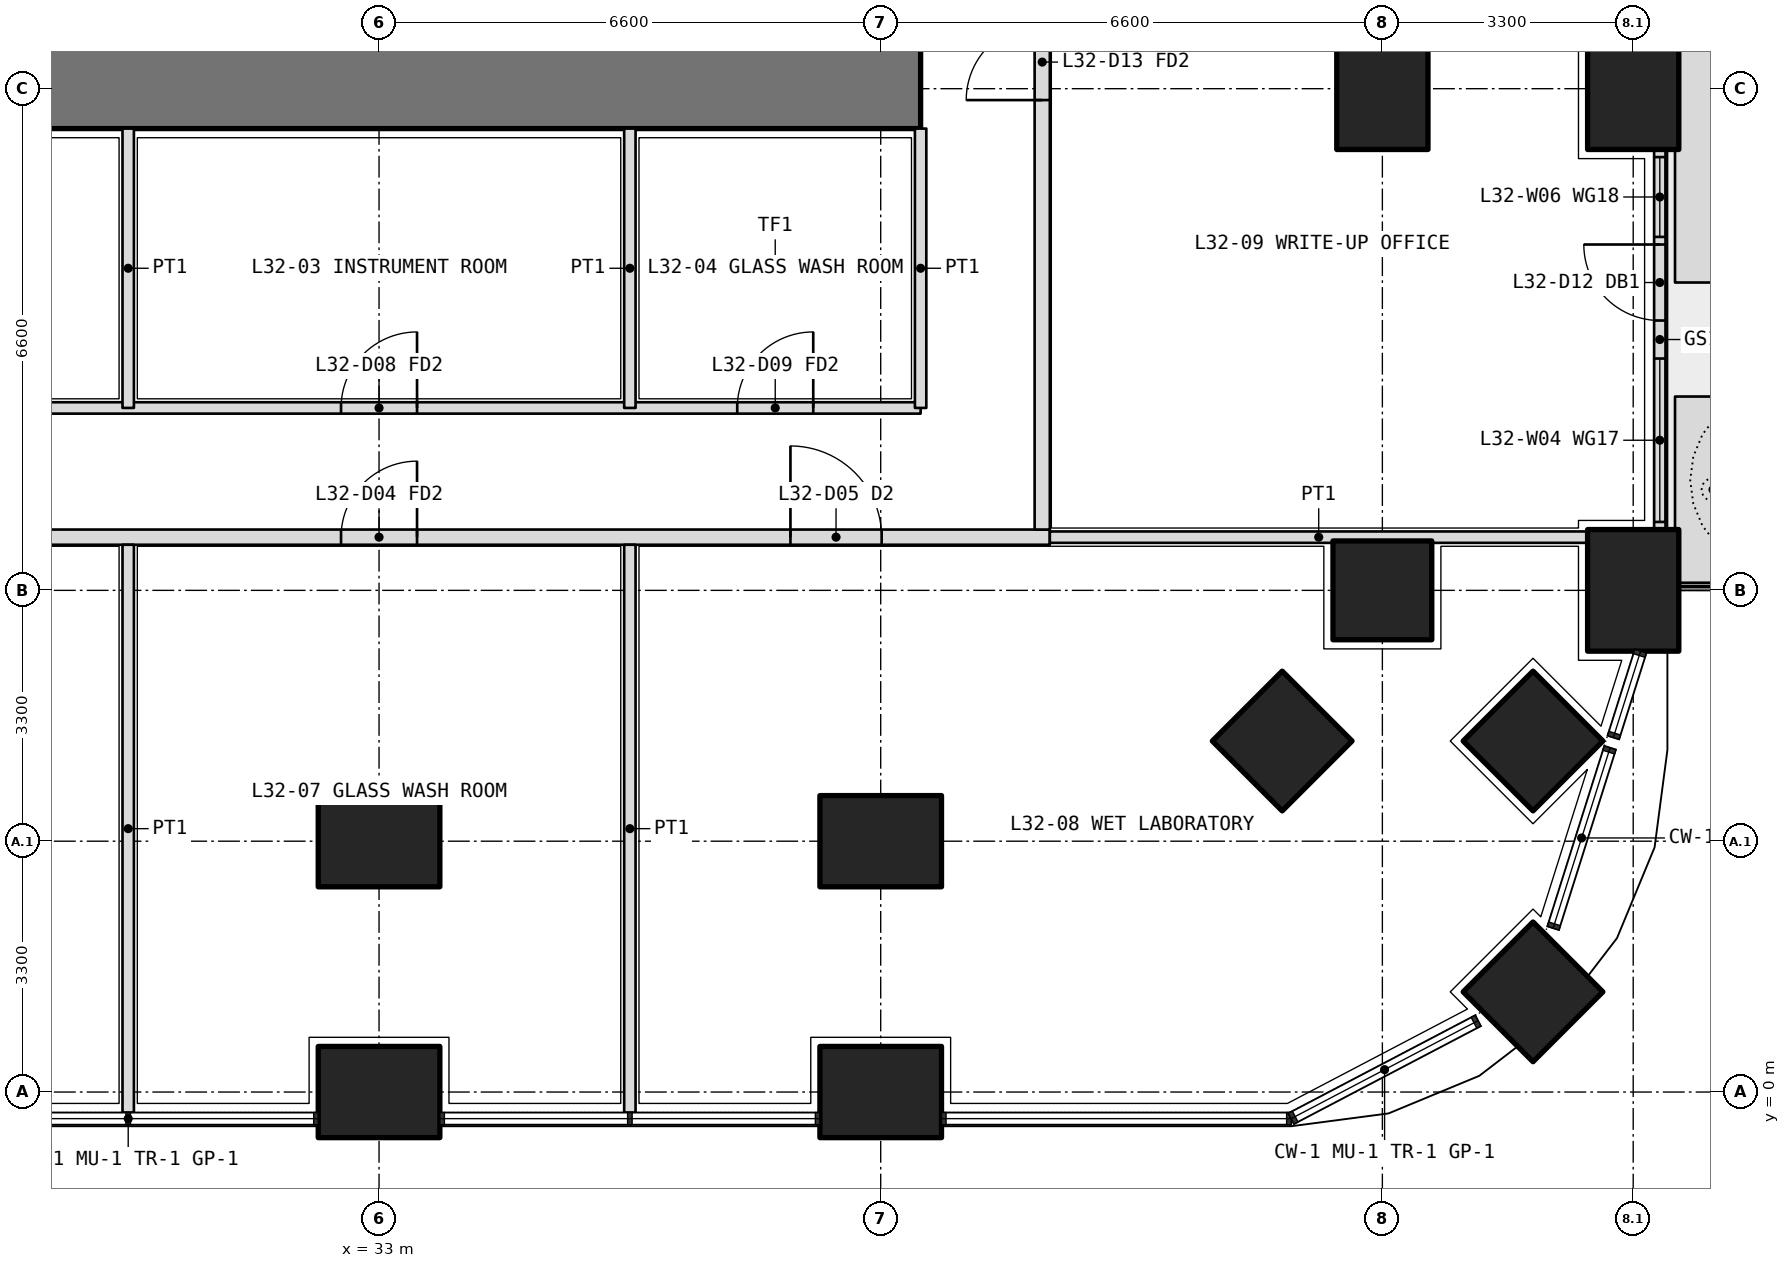
"""IFC4 building model, lengths in metres.
Left out: names, types, materials, properties, quantities, classifications, styles, units other than length and angle.
Written with IfcOpenShell. Run it as: python <this file> out.ifc"""

import sys

from ifc_helpers import new_model, si_unit, direction, frame, frame_2d, origin, origin_2d, place, context, subcontext, project, spatial, polyline, rectangle, outline, extrude, element, fill, save


model = new_model("IFC4")
c1 = context("Model", 3, precision=1e-05, world=origin(), true_north=direction((0.0, 1.0)))
c2 = subcontext(c1, "Body", "Model", "MODEL_VIEW")
j1 = project(units=[si_unit("LENGTHUNIT", "METRE"), si_unit("PLANEANGLEUNIT", "RADIAN")], contexts=[c1])
p1 = place(None, origin())
s1 = spatial("IfcSite", under=j1, at=p1, CompositionType="ELEMENT")
p2 = place(p1, origin())
s2 = spatial("IfcBuilding", under=s1, at=p2, CompositionType="ELEMENT")
p3 = place(p2, frame((0.0, 0.0, 141.0)))
s3 = spatial("IfcBuildingStorey", under=s2, at=p3, CompositionType="ELEMENT", Elevation=141.0)
p4 = place(p3, frame((48.182, 1.318, 0.0), z_axis=(0.0, 0.0, 1.0), x_axis=(0.707106781187, 0.707106781187, 0.0)))
e1 = element("IfcColumn", 1, at=p4, inside=s3, PredefinedType="COLUMN", context=c2, shape_type="SweptSolid", body=[
    extrude(rectangle(XDim=1.3, YDim=1.3, at=origin_2d()), origin(), (0.0, 0.0, 1.0), 4.2),
])
for number, where, z_axis, x_axis in (
    (2, (33.0, 0.0, 0.0), (0.0, 0.0, 1.0), (1.0, 0.0, 0.0)),
    (3, (39.6, 0.0, 0.0), (0.0, 0.0, 1.0), (1.0, 0.0, 0.0)),
    (4, (49.5, 6.6, 0.0), (0.0, 0.0, 1.0), (0.0, 1.0, 0.0)),
    (5, (49.5, 13.2, 0.0), (0.0, 0.0, 1.0), (0.0, 1.0, 0.0)),
):
    element("IfcColumn", number, at=place(p3, frame(where, z_axis=z_axis, x_axis=x_axis)), inside=s3, PredefinedType="COLUMN", context=c2, shape_type="SweptSolid", body=[
        extrude(rectangle(XDim=1.6, YDim=1.2, at=origin_2d()), origin(), (0.0, 0.0, 1.0), 4.2),
    ])
for number, where, z_axis, x_axis in (
    (6, (46.2, 6.6, 0.0), (0.0, 0.0, 1.0), (1.0, 0.0, 0.0)),
    (7, (48.182, 4.618, 0.0), (0.0, 0.0, 1.0), (0.707, 0.707, 0.0)),
):
    element("IfcColumn", number, at=place(p3, frame(where, z_axis=z_axis, x_axis=x_axis)), inside=s3, PredefinedType="COLUMN", context=c2, shape_type="SweptSolid", body=[
        extrude(rectangle(XDim=1.3, YDim=1.3, at=origin_2d()), origin(), (0.0, 0.0, 1.0), 4.2),
    ])
for number, where, z_axis, x_axis in (
    (8, (33.0, 3.3, 0.0), (0.0, 0.0, 1.0), (1.0, 0.0, 0.0)),
    (9, (39.6, 3.3, 0.0), (0.0, 0.0, 1.0), (1.0, 0.0, 0.0)),
):
    element("IfcColumn", number, at=place(p3, frame(where, z_axis=z_axis, x_axis=x_axis)), inside=s3, PredefinedType="COLUMN", context=c2, shape_type="SweptSolid", body=[
        extrude(rectangle(XDim=1.6, YDim=1.2, at=origin_2d()), origin(), (0.0, 0.0, 1.0), 4.2),
    ])
p5 = place(p3, frame((44.882, 4.618, 0.0), z_axis=(0.0, 0.0, 1.0), x_axis=(0.707106781187, 0.707106781187, 0.0)))
e10 = element("IfcColumn", 10, at=p5, inside=s3, PredefinedType="COLUMN", context=c2, shape_type="SweptSolid", body=[
    extrude(rectangle(XDim=1.3, YDim=1.3, at=origin_2d()), origin(), (0.0, 0.0, 1.0), 4.2),
])
p6 = place(p3, frame((46.2, 13.2, 0.0), z_axis=(0.0, 0.0, 1.0), x_axis=(0.0, 1.0, 0.0)))
e11 = element("IfcColumn", 11, at=p6, inside=s3, PredefinedType="COLUMN", context=c2, shape_type="SweptSolid", body=[
    extrude(rectangle(XDim=1.6, YDim=1.2, at=origin_2d()), origin(), (0.0, 0.0, 1.0), 4.2),
])
p7 = place(p3, origin())
e12 = element("IfcWall", 12, at=p7, inside=s3, PredefinedType="USERDEFINED", context=c2, shape_type="SweptSolid", body=[
    extrude(outline(polyline([(50.05, 6.7), (51.05, 6.7), (51.05, 9.15), (50.05, 9.15), (50.05, 6.7)]), holes=[polyline([(50.2, 6.85), (50.9, 6.85), (50.9, 9.0), (50.2, 9.0), (50.2, 6.85)])]), origin(), (0.0, 0.0, 1.0), 1.05),
])
p8 = place(p3, origin())
e13 = element("IfcWall", 13, at=p8, inside=s3, PredefinedType="USERDEFINED", context=c2, shape_type="SweptSolid", body=[
    extrude(outline(polyline([(50.05, 10.65), (51.05, 10.65), (51.05, 19.7), (50.05, 19.7), (50.05, 10.65)]), holes=[polyline([(50.2, 10.8), (50.9, 10.8), (50.9, 19.55), (50.2, 19.55), (50.2, 10.8)])]), origin(), (0.0, 0.0, 1.0), 1.05),
])
p9 = place(p3, frame((49.85, 7.4, 0.0), z_axis=(0.0, 0.0, 1.0), x_axis=(0.0, 1.0, 0.0)))
e14 = element("IfcWall", 14, at=p9, inside=s3, PredefinedType="SOLIDWALL", context=c2, shape_type="SweptSolid", body=[
    extrude(rectangle(XDim=5.0, YDim=0.15, at=frame_2d((2.5, 0.0))), origin(), (0.0, 0.0, 1.0), 2.6),
])
p10 = place(p9, frame((2.75, 0.0, 0.0)))
e15 = element("IfcOpeningElement", 15, at=p10, cuts=e14, PredefinedType="OPENING", context=c2, shape_type="SweptSolid", body=[
    extrude(rectangle(XDim=1.0, YDim=2.4, at=frame_2d((0.5, 1.2))), frame((0.0, 0.085, 0.0), z_axis=(0.0, -1.0, 0.0), x_axis=(1.0, 0.0, 0.0)), (0.0, 0.0, 1.0), 0.17),
])
p11 = place(p9, frame((0.1, 0.0, 0.1)))
e16 = element("IfcOpeningElement", 16, at=p11, cuts=e14, PredefinedType="OPENING", context=c2, shape_type="SweptSolid", body=[
    extrude(rectangle(XDim=2.15, YDim=2.2, at=frame_2d((1.075, 1.1))), frame((0.0, 0.085, 0.0), z_axis=(0.0, -1.0, 0.0), x_axis=(1.0, 0.0, 0.0)), (0.0, 0.0, 1.0), 0.17),
])
p12 = place(p9, frame((3.85, 0.0, 0.1)))
e17 = element("IfcOpeningElement", 17, at=p12, cuts=e14, PredefinedType="OPENING", context=c2, shape_type="SweptSolid", body=[
    extrude(rectangle(XDim=1.05, YDim=2.2, at=frame_2d((0.525, 1.1))), frame((0.0, 0.085, 0.0), z_axis=(0.0, -1.0, 0.0), x_axis=(1.0, 0.0, 0.0)), (0.0, 0.0, 1.0), 0.17),
])
p13 = place(p3, frame((12.675, 13.2, 0.0), z_axis=(0.0, 0.0, 1.0), x_axis=(1.0, 0.0, 0.0)))
e18 = element("IfcWall", 18, at=p13, inside=s3, PredefinedType="SHEAR", context=c2, shape_type="SweptSolid", body=[
    extrude(rectangle(XDim=27.45, YDim=1.05, at=frame_2d((13.725, 0.0))), origin(), (0.0, 0.0, 1.0), 4.2),
])
p14 = place(p3, frame((12.675, 9.0, 0.0), z_axis=(0.0, 0.0, 1.0), x_axis=(1.0, 0.0, 0.0)))
e19 = element("IfcWall", 19, at=p14, inside=s3, PredefinedType="PARTITIONING", context=c2, shape_type="SweptSolid", body=[
    extrude(rectangle(XDim=27.45, YDim=0.15, at=frame_2d((13.725, 0.0))), origin(), (0.0, 0.0, 1.0), 2.85),
])
p15 = place(p14, frame((3.062, 0.0, 0.0)))
e20 = element("IfcOpeningElement", 20, at=p15, cuts=e19, PredefinedType="OPENING", context=c2, shape_type="SweptSolid", body=[
    extrude(rectangle(XDim=1.0, YDim=2.1, at=frame_2d((0.5, 1.05))), frame((0.0, 0.085, 0.0), z_axis=(0.0, -1.0, 0.0), x_axis=(1.0, 0.0, 0.0)), (0.0, 0.0, 1.0), 0.17),
])
p16 = place(p14, frame((11.575, 0.0, 0.0)))
e21 = element("IfcOpeningElement", 21, at=p16, cuts=e19, PredefinedType="OPENING", context=c2, shape_type="SweptSolid", body=[
    extrude(rectangle(XDim=1.0, YDim=2.1, at=frame_2d((0.5, 1.05))), frame((0.0, 0.085, 0.0), z_axis=(0.0, -1.0, 0.0), x_axis=(1.0, 0.0, 0.0)), (0.0, 0.0, 1.0), 0.17),
])
p17 = place(p14, frame((19.825, 0.0, 0.0)))
e22 = element("IfcOpeningElement", 22, at=p17, cuts=e19, PredefinedType="OPENING", context=c2, shape_type="SweptSolid", body=[
    extrude(rectangle(XDim=1.0, YDim=2.1, at=frame_2d((0.5, 1.05))), frame((0.0, 0.085, 0.0), z_axis=(0.0, -1.0, 0.0), x_axis=(1.0, 0.0, 0.0)), (0.0, 0.0, 1.0), 0.17),
])
p18 = place(p14, frame((25.038, 0.0, 0.0)))
e23 = element("IfcOpeningElement", 23, at=p18, cuts=e19, PredefinedType="OPENING", context=c2, shape_type="SweptSolid", body=[
    extrude(rectangle(XDim=1.0, YDim=2.1, at=frame_2d((0.5, 1.05))), frame((0.0, 0.085, 0.0), z_axis=(0.0, -1.0, 0.0), x_axis=(1.0, 0.0, 0.0)), (0.0, 0.0, 1.0), 0.17),
])
p19 = place(p3, frame((40.125, 12.675, 0.0), z_axis=(0.0, 0.0, 1.0), x_axis=(0.0, -1.0, 0.0)))
e24 = element("IfcWall", 24, at=p19, inside=s3, PredefinedType="PARTITIONING", context=c2, shape_type="SweptSolid", body=[
    extrude(rectangle(XDim=3.675, YDim=0.15, at=frame_2d((1.837, 0.0))), origin(), (0.0, 0.0, 1.0), 2.85),
])
for number, where, z_axis, x_axis in (
    (25, (29.7, 12.675, 0.0), (0.0, 0.0, 1.0), (0.0, -1.0, 0.0)),
    (26, (36.3, 12.675, 0.0), (0.0, 0.0, 1.0), (0.0, -1.0, 0.0)),
):
    element("IfcWall", number, at=place(p3, frame(where, z_axis=z_axis, x_axis=x_axis)), inside=s3, PredefinedType="PARTITIONING", context=c2, shape_type="SweptSolid", body=[
        extrude(rectangle(XDim=3.675, YDim=0.15, at=frame_2d((1.837, 0.0))), origin(), (0.0, 0.0, 1.0), 3.9),
    ])
p20 = place(p3, frame((10.975, 7.3, 0.0), z_axis=(0.0, 0.0, 1.0), x_axis=(1.0, 0.0, 0.0)))
e27 = element("IfcWall", 27, at=p20, inside=s3, PredefinedType="PARTITIONING", context=c2, shape_type="SweptSolid", body=[
    extrude(rectangle(XDim=30.85, YDim=0.2, at=frame_2d((15.425, 0.0))), origin(), (0.0, 0.0, 1.0), 2.85),
])
p21 = place(p20, frame((3.962, 0.0, 0.0)))
e28 = element("IfcOpeningElement", 28, at=p21, cuts=e27, PredefinedType="OPENING", context=c2, shape_type="SweptSolid", body=[
    extrude(rectangle(XDim=1.0, YDim=2.1, at=frame_2d((0.5, 1.05))), frame((0.0, 0.11, 0.0), z_axis=(0.0, -1.0, 0.0), x_axis=(1.0, 0.0, 0.0)), (0.0, 0.0, 1.0), 0.22),
])
p22 = place(p20, frame((13.275, 0.0, 0.0)))
e29 = element("IfcOpeningElement", 29, at=p22, cuts=e27, PredefinedType="OPENING", context=c2, shape_type="SweptSolid", body=[
    extrude(rectangle(XDim=1.0, YDim=2.1, at=frame_2d((0.5, 1.05))), frame((0.0, 0.11, 0.0), z_axis=(0.0, -1.0, 0.0), x_axis=(1.0, 0.0, 0.0)), (0.0, 0.0, 1.0), 0.22),
])
p23 = place(p20, frame((21.525, 0.0, 0.0)))
e30 = element("IfcOpeningElement", 30, at=p23, cuts=e27, PredefinedType="OPENING", context=c2, shape_type="SweptSolid", body=[
    extrude(rectangle(XDim=1.0, YDim=2.1, at=frame_2d((0.5, 1.05))), frame((0.0, 0.11, 0.0), z_axis=(0.0, -1.0, 0.0), x_axis=(1.0, 0.0, 0.0)), (0.0, 0.0, 1.0), 0.22),
])
p24 = place(p20, frame((27.438, 0.0, 0.0)))
e31 = element("IfcOpeningElement", 31, at=p24, cuts=e27, PredefinedType="OPENING", context=c2, shape_type="SweptSolid", body=[
    extrude(rectangle(XDim=1.2, YDim=2.1, at=frame_2d((0.6, 1.05))), frame((0.0, 0.11, 0.0), z_axis=(0.0, -1.0, 0.0), x_axis=(1.0, 0.0, 0.0)), (0.0, 0.0, 1.0), 0.22),
])
p25 = place(p3, frame((41.725, 7.4, 0.0), z_axis=(0.0, 0.0, 1.0), x_axis=(0.0, 1.0, 0.0)))
e32 = element("IfcWall", 32, at=p25, inside=s3, PredefinedType="PARTITIONING", context=c2, shape_type="SweptSolid", body=[
    extrude(rectangle(XDim=22.3, YDim=0.2, at=frame_2d((11.15, 0.0))), origin(), (0.0, 0.0, 1.0), 2.85),
])
p26 = place(p25, frame((5.65, 0.0, 0.0)))
e33 = element("IfcOpeningElement", 33, at=p26, cuts=e32, PredefinedType="OPENING", context=c2, shape_type="SweptSolid", body=[
    extrude(rectangle(XDim=1.0, YDim=2.1, at=frame_2d((0.5, 1.05))), frame((0.0, 0.11, 0.0), z_axis=(0.0, -1.0, 0.0), x_axis=(1.0, 0.0, 0.0)), (0.0, 0.0, 1.0), 0.22),
])
p27 = place(p25, frame((13.4, 0.0, 0.0)))
e34 = element("IfcOpeningElement", 34, at=p27, cuts=e32, PredefinedType="OPENING", context=c2, shape_type="SweptSolid", body=[
    extrude(rectangle(XDim=1.0, YDim=2.1, at=frame_2d((0.5, 1.05))), frame((0.0, 0.11, 0.0), z_axis=(0.0, -1.0, 0.0), x_axis=(1.0, 0.0, 0.0)), (0.0, 0.0, 1.0), 0.22),
])
p28 = place(p25, frame((16.75, 0.0, 0.0)))
e35 = element("IfcOpeningElement", 35, at=p28, cuts=e32, PredefinedType="OPENING", context=c2, shape_type="SweptSolid", body=[
    extrude(rectangle(XDim=0.9, YDim=2.1, at=frame_2d((0.45, 1.05))), frame((0.0, 0.11, 0.0), z_axis=(0.0, -1.0, 0.0), x_axis=(1.0, 0.0, 0.0)), (0.0, 0.0, 1.0), 0.22),
])
p29 = place(p25, frame((20.15, 0.0, 0.0)))
e36 = element("IfcOpeningElement", 36, at=p29, cuts=e32, PredefinedType="OPENING", context=c2, shape_type="SweptSolid", body=[
    extrude(rectangle(XDim=1.0, YDim=2.1, at=frame_2d((0.5, 1.05))), frame((0.0, 0.11, 0.0), z_axis=(0.0, -1.0, 0.0), x_axis=(1.0, 0.0, 0.0)), (0.0, 0.0, 1.0), 0.22),
])
p30 = place(p3, frame((48.9, 7.3, 0.0), z_axis=(0.0, 0.0, 1.0), x_axis=(-1.0, 0.0, 0.0)))
e37 = element("IfcWall", 37, at=p30, inside=s3, PredefinedType="PARTITIONING", context=c2, shape_type="SweptSolid", body=[
    extrude(rectangle(XDim=7.075, YDim=0.15, at=frame_2d((3.538, 0.0))), origin(), (0.0, 0.0, 1.0), 2.85),
])
for number, where, z_axis, x_axis in (
    (38, (29.7, -0.27, 0.0), (0.0, 0.0, 1.0), (0.0, 1.0, 0.0)),
    (39, (36.3, -0.27, 0.0), (0.0, 0.0, 1.0), (0.0, 1.0, 0.0)),
):
    element("IfcWall", number, at=place(p3, frame(where, z_axis=z_axis, x_axis=x_axis)), inside=s3, PredefinedType="PARTITIONING", context=c2, shape_type="SweptSolid", body=[
        extrude(rectangle(XDim=7.47, YDim=0.15, at=frame_2d((3.735, 0.0))), origin(), (0.0, 0.0, 1.0), 2.6),
    ])
p31 = place(p10, origin())
e40 = element("IfcDoor", 40, at=p31, inside=s3, OperationType="SINGLE_SWING_RIGHT", PredefinedType="DOOR", context=c2, shape_type="SweptSolid", body=[
    extrude(rectangle(XDim=1.0, YDim=2.4, at=frame_2d((0.5, 1.2))), frame((0.0, 0.025, 0.0), z_axis=(0.0, -1.0, 0.0), x_axis=(1.0, 0.0, 0.0)), (0.0, 0.0, 1.0), 0.05),
])
fill(e15, e40)
p32 = place(p11, origin())
e41 = element("IfcWindow", 41, at=p32, inside=s3, PartitioningType="SINGLE_PANEL", PredefinedType="WINDOW", context=c2, shape_type="SweptSolid", body=[
    extrude(rectangle(XDim=2.15, YDim=2.2, at=frame_2d((1.075, 1.1))), frame((0.0, 0.03, 0.0), z_axis=(0.0, -1.0, 0.0), x_axis=(1.0, 0.0, 0.0)), (0.0, 0.0, 1.0), 0.06),
])
fill(e16, e41)
p33 = place(p12, origin())
e42 = element("IfcWindow", 42, at=p33, inside=s3, PartitioningType="SINGLE_PANEL", PredefinedType="WINDOW", context=c2, shape_type="SweptSolid", body=[
    extrude(rectangle(XDim=1.05, YDim=2.2, at=frame_2d((0.525, 1.1))), frame((0.0, 0.03, 0.0), z_axis=(0.0, -1.0, 0.0), x_axis=(1.0, 0.0, 0.0)), (0.0, 0.0, 1.0), 0.06),
])
fill(e17, e42)
p34 = place(p17, origin())
e43 = element("IfcDoor", 43, at=p34, inside=s3, OperationType="SINGLE_SWING_RIGHT", PredefinedType="DOOR", context=c2, shape_type="SweptSolid", body=[
    extrude(rectangle(XDim=1.0, YDim=2.1, at=frame_2d((0.5, 1.05))), frame((0.0, 0.025, 0.0), z_axis=(0.0, -1.0, 0.0), x_axis=(1.0, 0.0, 0.0)), (0.0, 0.0, 1.0), 0.05),
])
fill(e22, e43)
p35 = place(p18, origin())
e44 = element("IfcDoor", 44, at=p35, inside=s3, OperationType="SINGLE_SWING_RIGHT", PredefinedType="DOOR", context=c2, shape_type="SweptSolid", body=[
    extrude(rectangle(XDim=1.0, YDim=2.1, at=frame_2d((0.5, 1.05))), frame((0.0, 0.025, 0.0), z_axis=(0.0, -1.0, 0.0), x_axis=(1.0, 0.0, 0.0)), (0.0, 0.0, 1.0), 0.05),
])
fill(e23, e44)
p36 = place(p23, origin())
e45 = element("IfcDoor", 45, at=p36, inside=s3, OperationType="SINGLE_SWING_RIGHT", PredefinedType="DOOR", context=c2, shape_type="SweptSolid", body=[
    extrude(rectangle(XDim=1.0, YDim=2.1, at=frame_2d((0.5, 1.05))), frame((0.0, 0.025, 0.0), z_axis=(0.0, -1.0, 0.0), x_axis=(1.0, 0.0, 0.0)), (0.0, 0.0, 1.0), 0.05),
])
fill(e30, e45)
p37 = place(p24, origin())
e46 = element("IfcDoor", 46, at=p37, inside=s3, OperationType="DOUBLE_DOOR_SINGLE_SWING", PredefinedType="DOOR", context=c2, shape_type="SweptSolid", body=[
    extrude(rectangle(XDim=1.2, YDim=2.1, at=frame_2d((0.6, 1.05))), frame((0.0, 0.025, 0.0), z_axis=(0.0, -1.0, 0.0), x_axis=(1.0, 0.0, 0.0)), (0.0, 0.0, 1.0), 0.05),
])
fill(e31, e46)
p38 = place(p26, origin())
e47 = element("IfcDoor", 47, at=p38, inside=s3, OperationType="SINGLE_SWING_LEFT", PredefinedType="DOOR", context=c2, shape_type="SweptSolid", body=[
    extrude(rectangle(XDim=1.0, YDim=2.1, at=frame_2d((0.5, 1.05))), frame((0.0, 0.025, 0.0), z_axis=(0.0, -1.0, 0.0), x_axis=(1.0, 0.0, 0.0)), (0.0, 0.0, 1.0), 0.05),
])
fill(e33, e47)
save(model, sys.argv[1])
